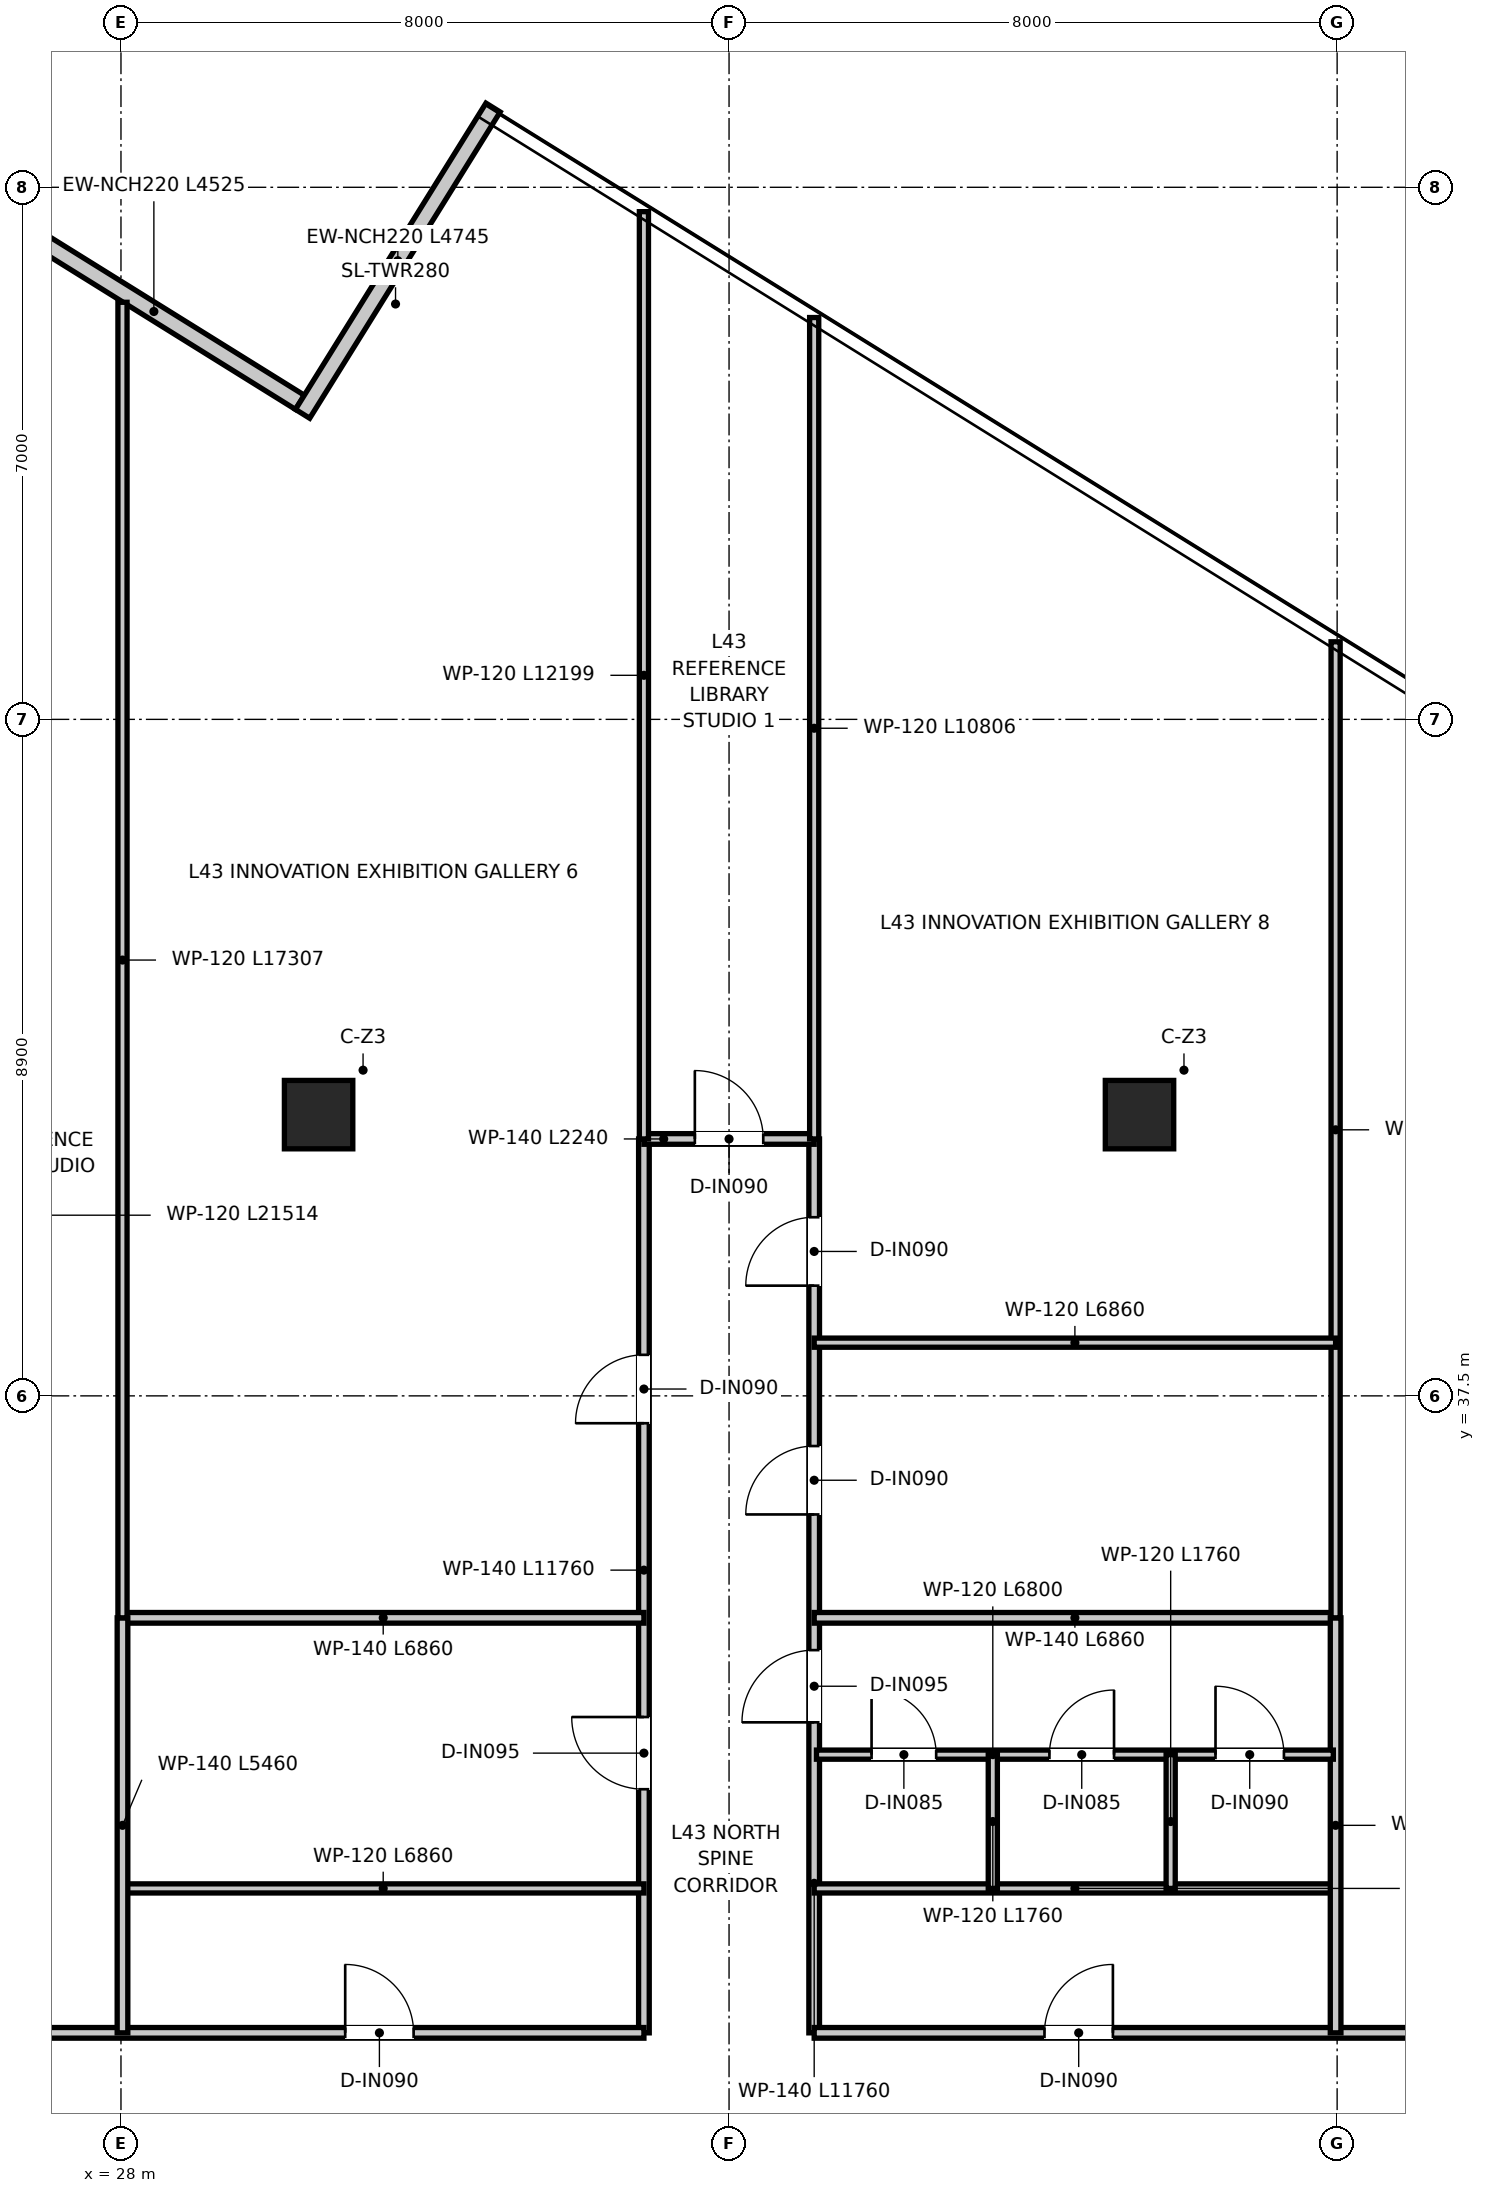
"""IFC4 building model, lengths in metres.
Left out: names, types, materials, properties, quantities, classifications, styles, units other than length and angle.
Written with IfcOpenShell. Run it as: python <this file> out.ifc"""

import sys

from ifc_helpers import new_model, si_unit, direction, frame, frame_2d, origin, origin_2d, place, context, subcontext, project, spatial, rectangle, extrude, source, transform, mapped, element, fill, save


model = new_model("IFC4")
c1 = context("Model", 3, precision=1e-05, world=origin(), true_north=direction((0.0, 1.0)))
c2 = subcontext(c1, "Body", "Model", "MODEL_VIEW")
j1 = project(units=[si_unit("LENGTHUNIT", "METRE"), si_unit("PLANEANGLEUNIT", "RADIAN")], contexts=[c1])
p1 = place(None, origin())
s1 = spatial("IfcSite", under=j1, at=p1, CompositionType="ELEMENT")
p2 = place(p1, origin())
s2 = spatial("IfcBuilding", under=s1, at=p2, CompositionType="ELEMENT")
p3 = place(p2, frame((0.0, 0.0, 177.8)))
s3 = spatial("IfcBuildingStorey", under=s2, at=p3, CompositionType="ELEMENT", Elevation=177.8)
m1 = source(origin(), c2, "Body", "SweptSolid", [
    extrude(rectangle(XDim=0.9, YDim=0.9, at=origin_2d()), origin(), (0.0, 0.0, 1.0), 3.95),
])
for number, where, z_axis, x_axis in (
    (1, (30.6, 41.2, 0.0), (0.0, 0.0, 1.0), (1.0, 0.0, 0.0)),
    (2, (41.4, 41.2, 0.0), (0.0, 0.0, 1.0), (1.0, 0.0, 0.0)),
):
    element("IfcColumn", number, at=place(p3, frame(where, z_axis=z_axis, x_axis=x_axis)), inside=s3, PredefinedType="COLUMN", context=c2, shape_type="MappedRepresentation", body=[
        mapped(m1, transform((0.0, 0.0, 0.0), x_axis=(1.0, 0.0, 0.0), y_axis=(0.0, 1.0, 0.0), z_axis=(0.0, 0.0, 1.0), scale=1.0)),
    ])
p4 = place(p3, frame((30.354, 50.571, 0.0), z_axis=(0.0, 0.0, 1.0), x_axis=(-0.849196398465, 0.528077150456, 0.0)))
e3 = element("IfcWall", 3, at=p4, inside=s3, PredefinedType="ELEMENTEDWALL", context=c2, shape_type="SweptSolid", body=[
    extrude(rectangle(XDim=4.525, YDim=0.22, at=frame_2d((2.263, 0.0))), origin(), (0.0, 0.0, 1.0), 3.67),
])
p5 = place(p3, frame((32.895, 54.449, 0.0), z_axis=(0.0, 0.0, 1.0), x_axis=(-0.528110642948, -0.849175570071, 0.0)))
e4 = element("IfcWall", 4, at=p5, inside=s3, PredefinedType="ELEMENTEDWALL", context=c2, shape_type="SweptSolid", body=[
    extrude(rectangle(XDim=4.745, YDim=0.22, at=frame_2d((2.373, 0.0))), origin(), (0.0, 0.0, 1.0), 3.67),
])
p6 = place(p3, frame((34.88, 29.12, 0.0), z_axis=(0.0, 0.0, 1.0), x_axis=(0.0, 1.0, 0.0)))
e5 = element("IfcWall", 5, at=p6, inside=s3, PredefinedType="PARTITIONING", context=c2, shape_type="SweptSolid", body=[
    extrude(rectangle(XDim=11.76, YDim=0.14, at=frame_2d((5.88, 0.0))), origin(), (0.0, 0.0, 1.0), 3.03),
])
p7 = place(p6, frame((3.205, 0.0, 0.0)))
e6 = element("IfcOpeningElement", 6, at=p7, cuts=e5, PredefinedType="OPENING", context=c2, shape_type="SweptSolid", body=[
    extrude(rectangle(XDim=0.95, YDim=2.1, at=frame_2d((0.475, 1.05))), frame((0.0, 0.08, 0.0), z_axis=(0.0, -1.0, 0.0), x_axis=(1.0, 0.0, 0.0)), (0.0, 0.0, 1.0), 0.16),
])
p8 = place(p6, frame((8.02, 0.0, 0.0)))
e7 = element("IfcOpeningElement", 7, at=p8, cuts=e5, PredefinedType="OPENING", context=c2, shape_type="SweptSolid", body=[
    extrude(rectangle(XDim=0.9, YDim=2.1, at=frame_2d((0.45, 1.05))), frame((0.0, 0.08, 0.0), z_axis=(0.0, -1.0, 0.0), x_axis=(1.0, 0.0, 0.0)), (0.0, 0.0, 1.0), 0.16),
])
p9 = place(p3, frame((37.12, 29.12, 0.0), z_axis=(0.0, 0.0, 1.0), x_axis=(0.0, 1.0, 0.0)))
e8 = element("IfcWall", 8, at=p9, inside=s3, PredefinedType="PARTITIONING", context=c2, shape_type="SweptSolid", body=[
    extrude(rectangle(XDim=11.76, YDim=0.14, at=frame_2d((5.88, 0.0))), origin(), (0.0, 0.0, 1.0), 3.03),
])
p10 = place(p9, frame((4.085, 0.0, 0.0)))
e9 = element("IfcOpeningElement", 9, at=p10, cuts=e8, PredefinedType="OPENING", context=c2, shape_type="SweptSolid", body=[
    extrude(rectangle(XDim=0.95, YDim=2.1, at=frame_2d((0.475, 1.05))), frame((0.0, 0.08, 0.0), z_axis=(0.0, -1.0, 0.0), x_axis=(1.0, 0.0, 0.0)), (0.0, 0.0, 1.0), 0.16),
])
p11 = place(p9, frame((6.82, 0.0, 0.0)))
e10 = element("IfcOpeningElement", 10, at=p11, cuts=e8, PredefinedType="OPENING", context=c2, shape_type="SweptSolid", body=[
    extrude(rectangle(XDim=0.9, YDim=2.1, at=frame_2d((0.45, 1.05))), frame((0.0, 0.08, 0.0), z_axis=(0.0, -1.0, 0.0), x_axis=(1.0, 0.0, 0.0)), (0.0, 0.0, 1.0), 0.16),
])
p12 = place(p9, frame((9.83, 0.0, 0.0)))
e11 = element("IfcOpeningElement", 11, at=p12, cuts=e8, PredefinedType="OPENING", context=c2, shape_type="SweptSolid", body=[
    extrude(rectangle(XDim=0.9, YDim=2.1, at=frame_2d((0.45, 1.05))), frame((0.0, 0.08, 0.0), z_axis=(0.0, -1.0, 0.0), x_axis=(1.0, 0.0, 0.0)), (0.0, 0.0, 1.0), 0.16),
])
p13 = place(p3, frame((34.88, 40.88, 0.0), z_axis=(0.0, 0.0, 1.0), x_axis=(1.0, 0.0, 0.0)))
e12 = element("IfcWall", 12, at=p13, inside=s3, PredefinedType="PARTITIONING", context=c2, shape_type="SweptSolid", body=[
    extrude(rectangle(XDim=2.24, YDim=0.14, at=frame_2d((1.12, 0.0))), origin(), (0.0, 0.0, 1.0), 3.67),
])
p14 = place(p13, frame((0.67, 0.0, 0.0)))
e13 = element("IfcOpeningElement", 13, at=p14, cuts=e12, PredefinedType="OPENING", context=c2, shape_type="SweptSolid", body=[
    extrude(rectangle(XDim=0.9, YDim=2.1, at=frame_2d((0.45, 1.05))), frame((0.0, 0.08, 0.0), z_axis=(0.0, -1.0, 0.0), x_axis=(1.0, 0.0, 0.0)), (0.0, 0.0, 1.0), 0.16),
])
p15 = place(p3, frame((11.822, 29.12, 0.0), z_axis=(0.0, 0.0, 1.0), x_axis=(1.0, 0.0, 0.0)))
e14 = element("IfcWall", 14, at=p15, inside=s3, PredefinedType="PARTITIONING", context=c2, shape_type="SweptSolid", body=[
    extrude(rectangle(XDim=23.058, YDim=0.14, at=frame_2d((11.529, 0.0))), origin(), (0.0, 0.0, 1.0), 3.03),
])
p16 = place(p15, frame((19.128, 0.0, 0.0)))
e15 = element("IfcOpeningElement", 15, at=p16, cuts=e14, PredefinedType="OPENING", context=c2, shape_type="SweptSolid", body=[
    extrude(rectangle(XDim=0.9, YDim=2.1, at=frame_2d((0.45, 1.05))), frame((0.0, 0.08, 0.0), z_axis=(0.0, -1.0, 0.0), x_axis=(1.0, 0.0, 0.0)), (0.0, 0.0, 1.0), 0.16),
])
p17 = place(p15, frame((2.137, 0.0, 0.0)))
e16 = element("IfcOpeningElement", 16, at=p17, cuts=e14, PredefinedType="OPENING", context=c2, shape_type="SweptSolid", body=[
    extrude(rectangle(XDim=0.9, YDim=2.1, at=frame_2d((0.45, 1.05))), frame((0.0, 0.08, 0.0), z_axis=(0.0, -1.0, 0.0), x_axis=(1.0, 0.0, 0.0)), (0.0, 0.0, 1.0), 0.16),
])
p18 = place(p15, frame((8.728, 0.0, 0.0)))
e17 = element("IfcOpeningElement", 17, at=p18, cuts=e14, PredefinedType="OPENING", context=c2, shape_type="SweptSolid", body=[
    extrude(rectangle(XDim=0.9, YDim=2.1, at=frame_2d((0.45, 1.05))), frame((0.0, 0.08, 0.0), z_axis=(0.0, -1.0, 0.0), x_axis=(1.0, 0.0, 0.0)), (0.0, 0.0, 1.0), 0.16),
])
p19 = place(p15, frame((11.578, 0.0, 0.0)))
e18 = element("IfcOpeningElement", 18, at=p19, cuts=e14, PredefinedType="OPENING", context=c2, shape_type="SweptSolid", body=[
    extrude(rectangle(XDim=0.9, YDim=2.1, at=frame_2d((0.45, 1.05))), frame((0.0, 0.08, 0.0), z_axis=(0.0, -1.0, 0.0), x_axis=(1.0, 0.0, 0.0)), (0.0, 0.0, 1.0), 0.16),
])
p20 = place(p15, frame((14.128, 0.0, 0.0)))
e19 = element("IfcOpeningElement", 19, at=p20, cuts=e14, PredefinedType="OPENING", context=c2, shape_type="SweptSolid", body=[
    extrude(rectangle(XDim=0.9, YDim=2.1, at=frame_2d((0.45, 1.05))), frame((0.0, 0.08, 0.0), z_axis=(0.0, -1.0, 0.0), x_axis=(1.0, 0.0, 0.0)), (0.0, 0.0, 1.0), 0.16),
])
p21 = place(p3, frame((37.12, 29.12, 0.0), z_axis=(0.0, 0.0, 1.0), x_axis=(1.0, 0.0, 0.0)))
e20 = element("IfcWall", 20, at=p21, inside=s3, PredefinedType="PARTITIONING", context=c2, shape_type="SweptSolid", body=[
    extrude(rectangle(XDim=26.068, YDim=0.14, at=frame_2d((13.034, 0.0))), origin(), (0.0, 0.0, 1.0), 3.03),
])
p22 = place(p21, frame((3.03, 0.0, 0.0)))
e21 = element("IfcOpeningElement", 21, at=p22, cuts=e20, PredefinedType="OPENING", context=c2, shape_type="SweptSolid", body=[
    extrude(rectangle(XDim=0.9, YDim=2.1, at=frame_2d((0.45, 1.05))), frame((0.0, 0.08, 0.0), z_axis=(0.0, -1.0, 0.0), x_axis=(1.0, 0.0, 0.0)), (0.0, 0.0, 1.0), 0.16),
])
p23 = place(p21, frame((15.761, 0.0, 0.0)))
e22 = element("IfcOpeningElement", 22, at=p23, cuts=e20, PredefinedType="OPENING", context=c2, shape_type="SweptSolid", body=[
    extrude(rectangle(XDim=0.9, YDim=2.1, at=frame_2d((0.45, 1.05))), frame((0.0, 0.08, 0.0), z_axis=(0.0, -1.0, 0.0), x_axis=(1.0, 0.0, 0.0)), (0.0, 0.0, 1.0), 0.16),
])
for number, where, z_axis, x_axis in (
    (23, (28.02, 31.02, 0.0), (0.0, 0.0, 1.0), (1.0, 0.0, 0.0)),
    (24, (37.12, 31.02, 0.0), (0.0, 0.0, 1.0), (1.0, 0.0, 0.0)),
):
    element("IfcWall", number, at=place(p3, frame(where, z_axis=z_axis, x_axis=x_axis)), inside=s3, PredefinedType="PARTITIONING", context=c2, shape_type="SweptSolid", body=[
        extrude(rectangle(XDim=6.86, YDim=0.12, at=frame_2d((3.43, 0.0))), origin(), (0.0, 0.0, 1.0), 3.08),
    ])
for number, where, z_axis, x_axis in (
    (25, (28.02, 34.58, 0.0), (0.0, 0.0, 1.0), (1.0, 0.0, 0.0)),
    (26, (37.12, 34.58, 0.0), (0.0, 0.0, 1.0), (1.0, 0.0, 0.0)),
):
    element("IfcWall", number, at=place(p3, frame(where, z_axis=z_axis, x_axis=x_axis)), inside=s3, PredefinedType="PARTITIONING", context=c2, shape_type="SweptSolid", body=[
        extrude(rectangle(XDim=6.86, YDim=0.14, at=frame_2d((3.43, 0.0))), origin(), (0.0, 0.0, 1.0), 3.08),
    ])
for number, where, z_axis, x_axis in (
    (27, (28.02, 29.12, 0.0), (0.0, 0.0, 1.0), (0.0, 1.0, 0.0)),
    (28, (43.98, 29.12, 0.0), (0.0, 0.0, 1.0), (0.0, 1.0, 0.0)),
):
    element("IfcWall", number, at=place(p3, frame(where, z_axis=z_axis, x_axis=x_axis)), inside=s3, PredefinedType="PARTITIONING", context=c2, shape_type="SweptSolid", body=[
        extrude(rectangle(XDim=5.46, YDim=0.14, at=frame_2d((2.73, 0.0))), origin(), (0.0, 0.0, 1.0), 3.31),
    ])
p24 = place(p3, frame((37.15, 32.78, 0.0), z_axis=(0.0, 0.0, 1.0), x_axis=(1.0, 0.0, 0.0)))
e29 = element("IfcWall", 29, at=p24, inside=s3, PredefinedType="PARTITIONING", context=c2, shape_type="SweptSolid", body=[
    extrude(rectangle(XDim=6.8, YDim=0.12, at=frame_2d((3.4, 0.0))), origin(), (0.0, 0.0, 1.0), 3.08),
])
p25 = place(p24, frame((0.725, 0.0, 0.0)))
e30 = element("IfcOpeningElement", 30, at=p25, cuts=e29, PredefinedType="OPENING", context=c2, shape_type="SweptSolid", body=[
    extrude(rectangle(XDim=0.85, YDim=2.1, at=frame_2d((0.425, 1.05))), frame((0.0, 0.07, 0.0), z_axis=(0.0, -1.0, 0.0), x_axis=(1.0, 0.0, 0.0)), (0.0, 0.0, 1.0), 0.14),
])
p26 = place(p24, frame((3.065, 0.0, 0.0)))
e31 = element("IfcOpeningElement", 31, at=p26, cuts=e29, PredefinedType="OPENING", context=c2, shape_type="SweptSolid", body=[
    extrude(rectangle(XDim=0.85, YDim=2.1, at=frame_2d((0.425, 1.05))), frame((0.0, 0.07, 0.0), z_axis=(0.0, -1.0, 0.0), x_axis=(1.0, 0.0, 0.0)), (0.0, 0.0, 1.0), 0.14),
])
p27 = place(p24, frame((5.25, 0.0, 0.0)))
e32 = element("IfcOpeningElement", 32, at=p27, cuts=e29, PredefinedType="OPENING", context=c2, shape_type="SweptSolid", body=[
    extrude(rectangle(XDim=0.9, YDim=2.1, at=frame_2d((0.45, 1.05))), frame((0.0, 0.07, 0.0), z_axis=(0.0, -1.0, 0.0), x_axis=(1.0, 0.0, 0.0)), (0.0, 0.0, 1.0), 0.14),
])
for number, where, z_axis, x_axis in (
    (33, (39.47, 31.02, 0.0), (0.0, 0.0, 1.0), (0.0, 1.0, 0.0)),
    (34, (41.81, 31.02, 0.0), (0.0, 0.0, 1.0), (0.0, 1.0, 0.0)),
):
    element("IfcWall", number, at=place(p3, frame(where, z_axis=z_axis, x_axis=x_axis)), inside=s3, PredefinedType="PARTITIONING", context=c2, shape_type="SweptSolid", body=[
        extrude(rectangle(XDim=1.76, YDim=0.12, at=frame_2d((0.88, 0.0))), origin(), (0.0, 0.0, 1.0), 3.67),
    ])
p28 = place(p3, frame((34.88, 40.88, 0.0), z_axis=(0.0, 0.0, 1.0), x_axis=(0.0, 1.0, 0.0)))
e35 = element("IfcWall", 35, at=p28, inside=s3, PredefinedType="PARTITIONING", context=c2, shape_type="SweptSolid", body=[
    extrude(rectangle(XDim=12.199, YDim=0.12, at=frame_2d((6.1, 0.0))), origin(), (0.0, 0.0, 1.0), 3.28),
])
p29 = place(p3, frame((37.12, 40.88, 0.0), z_axis=(0.0, 0.0, 1.0), x_axis=(0.0, 1.0, 0.0)))
e36 = element("IfcWall", 36, at=p29, inside=s3, PredefinedType="PARTITIONING", context=c2, shape_type="SweptSolid", body=[
    extrude(rectangle(XDim=10.807, YDim=0.12, at=frame_2d((5.403, 0.0))), origin(), (0.0, 0.0, 1.0), 3.28),
])
p30 = place(p3, frame((28.02, 34.58, 0.0), z_axis=(0.0, 0.0, 1.0), x_axis=(0.0, 1.0, 0.0)))
e37 = element("IfcWall", 37, at=p30, inside=s3, PredefinedType="PARTITIONING", context=c2, shape_type="SweptSolid", body=[
    extrude(rectangle(XDim=17.307, YDim=0.12, at=frame_2d((8.654, 0.0))), origin(), (0.0, 0.0, 1.0), 3.03),
])
p31 = place(p3, frame((43.98, 34.58, 0.0), z_axis=(0.0, 0.0, 1.0), x_axis=(0.0, 1.0, 0.0)))
e38 = element("IfcWall", 38, at=p31, inside=s3, PredefinedType="PARTITIONING", context=c2, shape_type="SweptSolid", body=[
    extrude(rectangle(XDim=12.841, YDim=0.12, at=frame_2d((6.42, 0.0))), origin(), (0.0, 0.0, 1.0), 3.03),
])
p32 = place(p3, frame((37.12, 38.2, 0.0), z_axis=(0.0, 0.0, 1.0), x_axis=(1.0, 0.0, 0.0)))
e39 = element("IfcWall", 39, at=p32, inside=s3, PredefinedType="PARTITIONING", context=c2, shape_type="SweptSolid", body=[
    extrude(rectangle(XDim=6.86, YDim=0.12, at=frame_2d((3.43, 0.0))), origin(), (0.0, 0.0, 1.0), 3.08),
])
p33 = place(p16, origin())
e40 = element("IfcDoor", 40, at=p33, inside=s3, OperationType="SINGLE_SWING_LEFT", PredefinedType="DOOR", context=c2, shape_type="SweptSolid", body=[
    extrude(rectangle(XDim=0.9, YDim=2.1, at=frame_2d((0.45, 1.05))), frame((0.0, 0.025, 0.0), z_axis=(0.0, -1.0, 0.0), x_axis=(1.0, 0.0, 0.0)), (0.0, 0.0, 1.0), 0.05),
])
fill(e15, e40)
p34 = place(p22, origin())
e41 = element("IfcDoor", 41, at=p34, inside=s3, OperationType="SINGLE_SWING_RIGHT", PredefinedType="DOOR", context=c2, shape_type="SweptSolid", body=[
    extrude(rectangle(XDim=0.9, YDim=2.1, at=frame_2d((0.45, 1.05))), frame((0.0, 0.025, 0.0), z_axis=(0.0, -1.0, 0.0), x_axis=(1.0, 0.0, 0.0)), (0.0, 0.0, 1.0), 0.05),
])
fill(e21, e41)
p35 = place(p10, origin())
e42 = element("IfcDoor", 42, at=p35, inside=s3, OperationType="SINGLE_SWING_LEFT", PredefinedType="DOOR", context=c2, shape_type="SweptSolid", body=[
    extrude(rectangle(XDim=0.95, YDim=2.1, at=frame_2d((0.475, 1.05))), frame((0.0, 0.025, 0.0), z_axis=(0.0, -1.0, 0.0), x_axis=(1.0, 0.0, 0.0)), (0.0, 0.0, 1.0), 0.05),
])
fill(e9, e42)
p36 = place(p7, origin())
e43 = element("IfcDoor", 43, at=p36, inside=s3, OperationType="SINGLE_SWING_RIGHT", PredefinedType="DOOR", context=c2, shape_type="SweptSolid", body=[
    extrude(rectangle(XDim=0.95, YDim=2.1, at=frame_2d((0.475, 1.05))), frame((0.0, 0.025, 0.0), z_axis=(0.0, -1.0, 0.0), x_axis=(1.0, 0.0, 0.0)), (0.0, 0.0, 1.0), 0.05),
])
fill(e6, e43)
p37 = place(p25, origin())
e44 = element("IfcDoor", 44, at=p37, inside=s3, OperationType="SINGLE_SWING_LEFT", PredefinedType="DOOR", context=c2, shape_type="SweptSolid", body=[
    extrude(rectangle(XDim=0.85, YDim=2.1, at=frame_2d((0.425, 1.05))), frame((0.0, 0.025, 0.0), z_axis=(0.0, -1.0, 0.0), x_axis=(1.0, 0.0, 0.0)), (0.0, 0.0, 1.0), 0.05),
])
fill(e30, e44)
p38 = place(p26, origin())
e45 = element("IfcDoor", 45, at=p38, inside=s3, OperationType="SINGLE_SWING_RIGHT", PredefinedType="DOOR", context=c2, shape_type="SweptSolid", body=[
    extrude(rectangle(XDim=0.85, YDim=2.1, at=frame_2d((0.425, 1.05))), frame((0.0, 0.025, 0.0), z_axis=(0.0, -1.0, 0.0), x_axis=(1.0, 0.0, 0.0)), (0.0, 0.0, 1.0), 0.05),
])
fill(e31, e45)
p39 = place(p27, origin())
e46 = element("IfcDoor", 46, at=p39, inside=s3, OperationType="SINGLE_SWING_LEFT", PredefinedType="DOOR", context=c2, shape_type="SweptSolid", body=[
    extrude(rectangle(XDim=0.9, YDim=2.1, at=frame_2d((0.45, 1.05))), frame((0.0, 0.025, 0.0), z_axis=(0.0, -1.0, 0.0), x_axis=(1.0, 0.0, 0.0)), (0.0, 0.0, 1.0), 0.05),
])
fill(e32, e46)
p40 = place(p14, origin())
e47 = element("IfcDoor", 47, at=p40, inside=s3, OperationType="SINGLE_SWING_LEFT", PredefinedType="DOOR", context=c2, shape_type="SweptSolid", body=[
    extrude(rectangle(XDim=0.9, YDim=2.1, at=frame_2d((0.45, 1.05))), frame((0.0, 0.025, 0.0), z_axis=(0.0, -1.0, 0.0), x_axis=(1.0, 0.0, 0.0)), (0.0, 0.0, 1.0), 0.05),
])
fill(e13, e47)
p41 = place(p8, origin())
e48 = element("IfcDoor", 48, at=p41, inside=s3, OperationType="SINGLE_SWING_LEFT", PredefinedType="DOOR", context=c2, shape_type="SweptSolid", body=[
    extrude(rectangle(XDim=0.9, YDim=2.1, at=frame_2d((0.45, 1.05))), frame((0.0, 0.025, 0.0), z_axis=(0.0, -1.0, 0.0), x_axis=(1.0, 0.0, 0.0)), (0.0, 0.0, 1.0), 0.05),
])
fill(e7, e48)
p42 = place(p11, origin())
e49 = element("IfcDoor", 49, at=p42, inside=s3, OperationType="SINGLE_SWING_LEFT", PredefinedType="DOOR", context=c2, shape_type="SweptSolid", body=[
    extrude(rectangle(XDim=0.9, YDim=2.1, at=frame_2d((0.45, 1.05))), frame((0.0, 0.025, 0.0), z_axis=(0.0, -1.0, 0.0), x_axis=(1.0, 0.0, 0.0)), (0.0, 0.0, 1.0), 0.05),
])
fill(e10, e49)
p43 = place(p12, origin())
e50 = element("IfcDoor", 50, at=p43, inside=s3, OperationType="SINGLE_SWING_LEFT", PredefinedType="DOOR", context=c2, shape_type="SweptSolid", body=[
    extrude(rectangle(XDim=0.9, YDim=2.1, at=frame_2d((0.45, 1.05))), frame((0.0, 0.025, 0.0), z_axis=(0.0, -1.0, 0.0), x_axis=(1.0, 0.0, 0.0)), (0.0, 0.0, 1.0), 0.05),
])
fill(e11, e50)
save(model, sys.argv[1])
